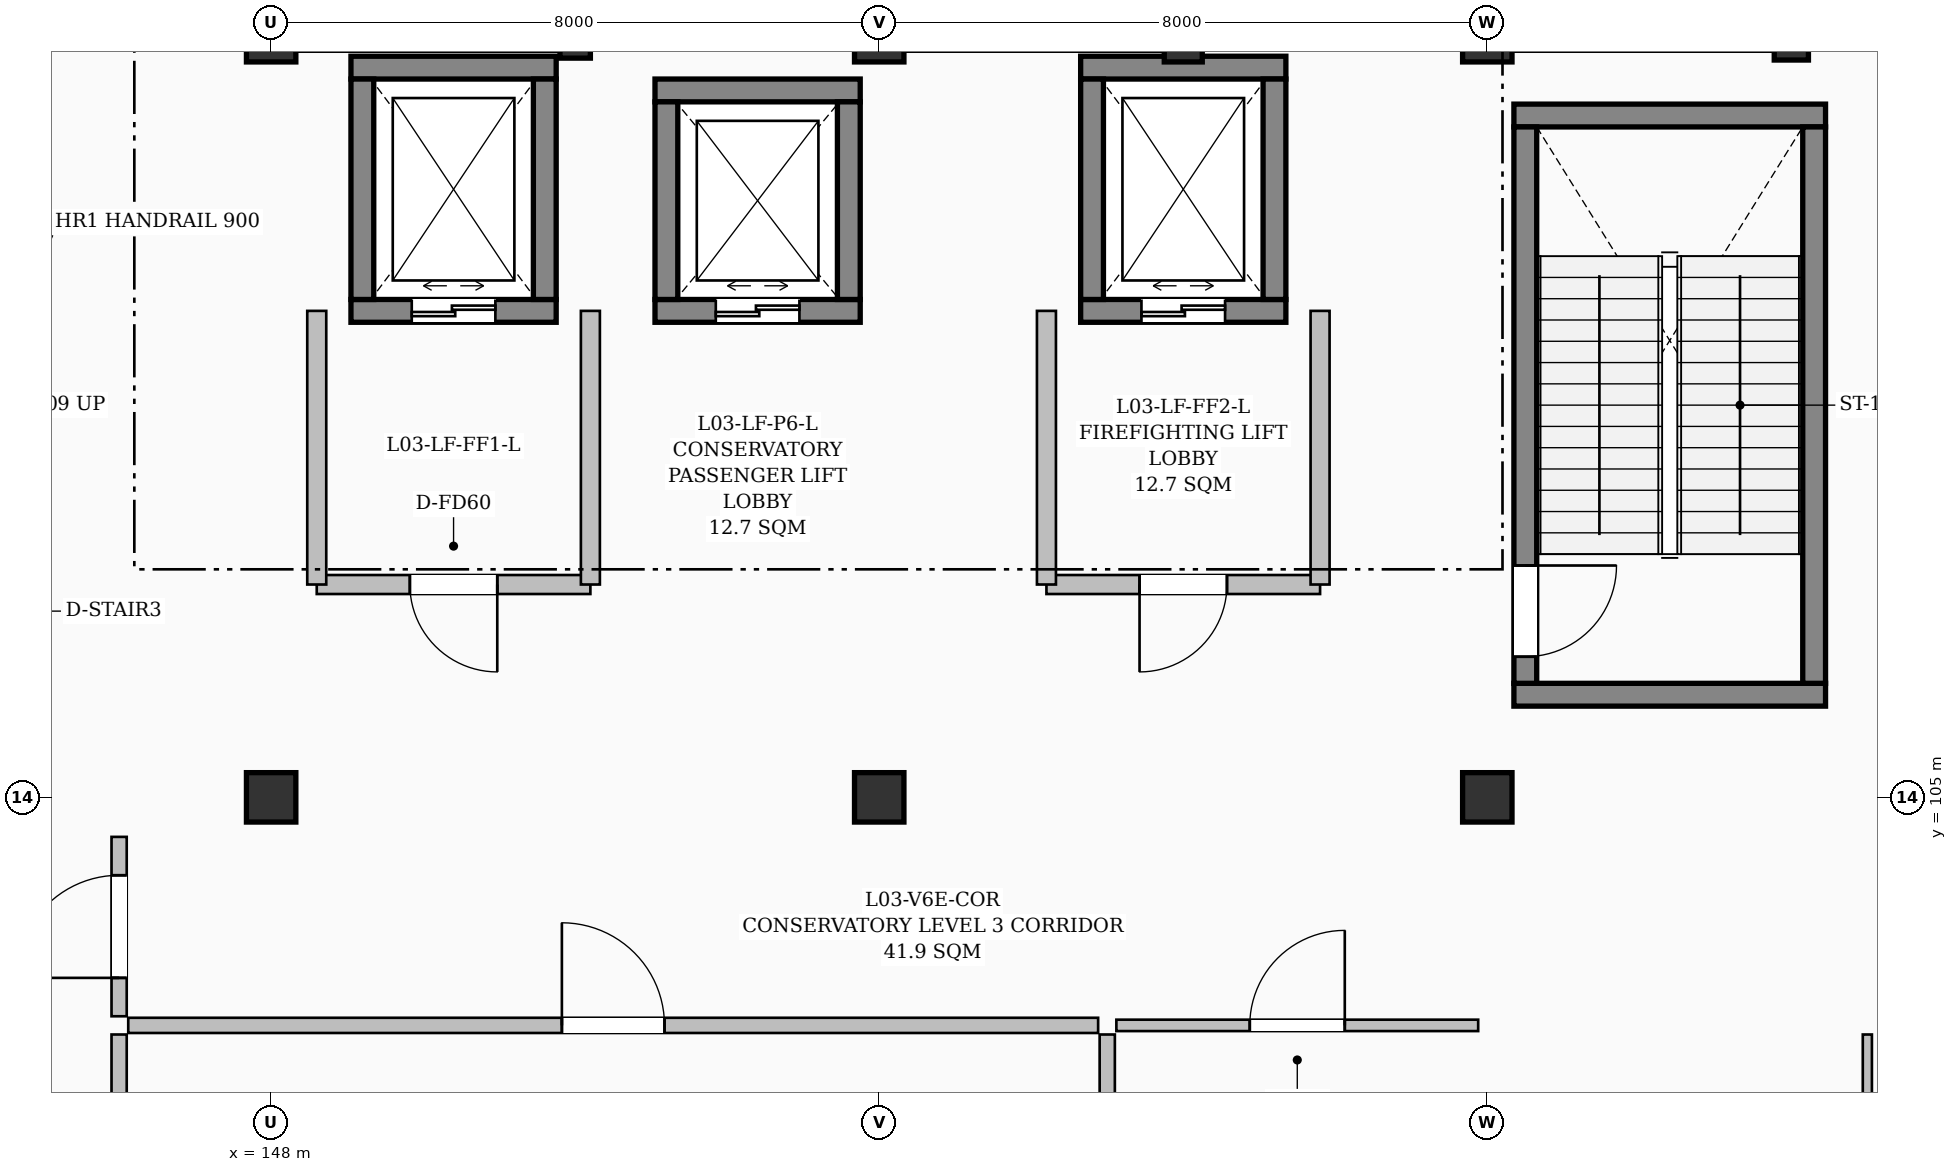
"""IFC4 building model, lengths in metres.
Left out: names, types, materials, properties, quantities, classifications, styles, units other than length and angle.
Written with IfcOpenShell. Run it as: python <this file> out.ifc"""

import sys

from ifc_helpers import new_model, si_unit, direction, frame, frame_2d, origin, origin_2d, place, context, subcontext, project, spatial, rectangle, extrude, element, fill, save


model = new_model("IFC4")
c1 = context("Model", 3, precision=1e-05, world=origin(), true_north=direction((0.0, 1.0)))
c2 = subcontext(c1, "Body", "Model", "MODEL_VIEW")
j1 = project(units=[si_unit("LENGTHUNIT", "METRE"), si_unit("PLANEANGLEUNIT", "RADIAN")], contexts=[c1])
p1 = place(None, origin())
s1 = spatial("IfcSite", under=j1, at=p1, CompositionType="ELEMENT")
p2 = place(p1, origin())
s2 = spatial("IfcBuilding", under=s1, at=p2, CompositionType="ELEMENT")
p3 = place(p2, frame((0.0, 0.0, 13.8)))
s3 = spatial("IfcBuildingStorey", under=s2, at=p3, CompositionType="ELEMENT", Elevation=13.8)
for number, where, z_axis, x_axis in (
    (1, (148.0, 105.0, 0.0), (0.0, 0.0, 1.0), (1.0, 0.0, 0.0)),
    (2, (148.0, 115.0, 0.0), (0.0, 0.0, 1.0), (1.0, 0.0, 0.0)),
):
    element("IfcColumn", number, at=place(p3, frame(where, z_axis=z_axis, x_axis=x_axis)), inside=s3, PredefinedType="COLUMN", context=c2, shape_type="SweptSolid", body=[
        extrude(rectangle(XDim=0.65, YDim=0.65, at=origin_2d()), origin(), (0.0, 0.0, 1.0), 4.5),
    ])
p4 = place(p3, frame((152.0, 115.0, 0.0), z_axis=(0.0, 0.0, 1.0), x_axis=(1.0, 0.0, 0.0)))
e3 = element("IfcColumn", 3, at=p4, inside=s3, PredefinedType="PILASTER", context=c2, shape_type="SweptSolid", body=[
    extrude(rectangle(XDim=0.4, YDim=0.55, at=origin_2d()), origin(), (0.0, 0.0, 1.0), 4.5),
])
for number, where, z_axis, x_axis in (
    (4, (156.0, 105.0, 0.0), (0.0, 0.0, 1.0), (1.0, 0.0, 0.0)),
    (5, (156.0, 115.0, 0.0), (0.0, 0.0, 1.0), (1.0, 0.0, 0.0)),
):
    element("IfcColumn", number, at=place(p3, frame(where, z_axis=z_axis, x_axis=x_axis)), inside=s3, PredefinedType="COLUMN", context=c2, shape_type="SweptSolid", body=[
        extrude(rectangle(XDim=0.65, YDim=0.65, at=origin_2d()), origin(), (0.0, 0.0, 1.0), 4.5),
    ])
p5 = place(p3, frame((160.0, 115.0, 0.0), z_axis=(0.0, 0.0, 1.0), x_axis=(1.0, 0.0, 0.0)))
e6 = element("IfcColumn", 6, at=p5, inside=s3, PredefinedType="PILASTER", context=c2, shape_type="SweptSolid", body=[
    extrude(rectangle(XDim=0.5, YDim=0.65, at=origin_2d()), origin(), (0.0, 0.0, 1.0), 4.5),
])
for number, where, z_axis, x_axis in (
    (7, (164.0, 105.0, 0.0), (0.0, 0.0, 1.0), (1.0, 0.0, 0.0)),
    (8, (164.0, 115.0, 0.0), (0.0, 0.0, 1.0), (1.0, 0.0, 0.0)),
):
    element("IfcColumn", number, at=place(p3, frame(where, z_axis=z_axis, x_axis=x_axis)), inside=s3, PredefinedType="COLUMN", context=c2, shape_type="SweptSolid", body=[
        extrude(rectangle(XDim=0.65, YDim=0.65, at=origin_2d()), origin(), (0.0, 0.0, 1.0), 4.5),
    ])
p6 = place(p3, frame((168.0, 115.0, 0.0), z_axis=(0.0, 0.0, 1.0), x_axis=(1.0, 0.0, 0.0)))
e9 = element("IfcColumn", 9, at=p6, inside=s3, PredefinedType="PILASTER", context=c2, shape_type="SweptSolid", body=[
    extrude(rectangle(XDim=0.45, YDim=0.6, at=origin_2d()), origin(), (0.0, 0.0, 1.0), 4.5),
])
for number, where, z_axis, x_axis in (
    (10, (164.35, 106.35, 0.0), (0.0, 0.0, 1.0), (1.0, 0.0, 0.0)),
    (11, (168.45, 113.97, 0.0), (0.0, 0.0, 1.0), (-1.0, 0.0, 0.0)),
):
    element("IfcWall", number, at=place(p3, frame(where, z_axis=z_axis, x_axis=x_axis)), inside=s3, PredefinedType="SHEAR", context=c2, shape_type="SweptSolid", body=[
        extrude(rectangle(XDim=4.1, YDim=0.3, at=frame_2d((2.05, 0.0))), origin(), (0.0, 0.0, 1.0), 4.27),
    ])
p7 = place(p3, frame((164.5, 113.82, 0.0), z_axis=(0.0, 0.0, 1.0), x_axis=(0.0, -1.0, 0.0)))
e12 = element("IfcWall", 12, at=p7, inside=s3, PredefinedType="SHEAR", context=c2, shape_type="SweptSolid", body=[
    extrude(rectangle(XDim=7.32, YDim=0.3, at=frame_2d((3.66, 0.0))), origin(), (0.0, 0.0, 1.0), 4.27),
])
p8 = place(p7, frame((5.77, 0.0, 0.0)))
e13 = element("IfcOpeningElement", 13, at=p8, cuts=e12, PredefinedType="OPENING", context=c2, shape_type="SweptSolid", body=[
    extrude(rectangle(XDim=1.2, YDim=2.15, at=frame_2d((0.6, 1.075))), frame((0.0, 0.16, 0.0), z_axis=(0.0, -1.0, 0.0), x_axis=(1.0, 0.0, 0.0)), (0.0, 0.0, 1.0), 0.32),
])
p9 = place(p3, frame((168.3, 113.82, 0.0), z_axis=(0.0, 0.0, 1.0), x_axis=(0.0, -1.0, 0.0)))
e14 = element("IfcWall", 14, at=p9, inside=s3, PredefinedType="SHEAR", context=c2, shape_type="SweptSolid", body=[
    extrude(rectangle(XDim=7.32, YDim=0.3, at=frame_2d((3.66, 0.0))), origin(), (0.0, 0.0, 1.0), 4.27),
])
p10 = place(p3, frame((149.05, 111.4, 0.0), z_axis=(0.0, 0.0, 1.0), x_axis=(1.0, 0.0, 0.0)))
e15 = element("IfcWall", 15, at=p10, inside=s3, PredefinedType="SHEAR", context=c2, shape_type="SweptSolid", body=[
    extrude(rectangle(XDim=2.7, YDim=0.3, at=frame_2d((1.35, 0.0))), origin(), (0.0, 0.0, 1.0), 4.27),
])
p11 = place(p10, frame((0.8, 0.0, 0.0)))
e16 = element("IfcOpeningElement", 16, at=p11, cuts=e15, PredefinedType="OPENING", context=c2, shape_type="SweptSolid", body=[
    extrude(rectangle(XDim=1.1, YDim=2.15, at=frame_2d((0.55, 1.075))), frame((0.0, 0.16, 0.0), z_axis=(0.0, -1.0, 0.0), x_axis=(1.0, 0.0, 0.0)), (0.0, 0.0, 1.0), 0.32),
])
p12 = place(p3, frame((151.75, 114.6, 0.0), z_axis=(0.0, 0.0, 1.0), x_axis=(-1.0, 0.0, 0.0)))
e17 = element("IfcWall", 17, at=p12, inside=s3, PredefinedType="SHEAR", context=c2, shape_type="SweptSolid", body=[
    extrude(rectangle(XDim=2.7, YDim=0.3, at=frame_2d((1.35, 0.0))), origin(), (0.0, 0.0, 1.0), 4.27),
])
for number, where, z_axis, x_axis in (
    (18, (149.2, 111.55, 0.0), (0.0, 0.0, 1.0), (0.0, 1.0, 0.0)),
    (19, (151.6, 114.45, 0.0), (0.0, 0.0, 1.0), (0.0, -1.0, 0.0)),
):
    element("IfcWall", number, at=place(p3, frame(where, z_axis=z_axis, x_axis=x_axis)), inside=s3, PredefinedType="SHEAR", context=c2, shape_type="SweptSolid", body=[
        extrude(rectangle(XDim=2.9, YDim=0.3, at=frame_2d((1.45, 0.0))), origin(), (0.0, 0.0, 1.0), 4.27),
    ])
p13 = place(p3, frame((152.2, 107.8, 0.0), z_axis=(0.0, 0.0, 1.0), x_axis=(-1.0, 0.0, 0.0)))
e20 = element("IfcWall", 20, at=p13, inside=s3, PredefinedType="SOLIDWALL", context=c2, shape_type="SweptSolid", body=[
    extrude(rectangle(XDim=3.6, YDim=0.25, at=frame_2d((1.8, 0.0))), origin(), (0.0, 0.0, 1.0), 4.27),
])
p14 = place(p13, frame((1.225, 0.0, 0.0)))
e21 = element("IfcOpeningElement", 21, at=p14, cuts=e20, PredefinedType="OPENING", context=c2, shape_type="SweptSolid", body=[
    extrude(rectangle(XDim=1.15, YDim=2.15, at=frame_2d((0.575, 1.075))), frame((0.0, 0.135, 0.0), z_axis=(0.0, -1.0, 0.0), x_axis=(1.0, 0.0, 0.0)), (0.0, 0.0, 1.0), 0.27),
])
for number, where, z_axis, x_axis in (
    (22, (148.6, 107.8, 0.0), (0.0, 0.0, 1.0), (0.0, 1.0, 0.0)),
    (23, (152.2, 111.4, 0.0), (0.0, 0.0, 1.0), (0.0, -1.0, 0.0)),
):
    element("IfcWall", number, at=place(p3, frame(where, z_axis=z_axis, x_axis=x_axis)), inside=s3, PredefinedType="SOLIDWALL", context=c2, shape_type="SweptSolid", body=[
        extrude(rectangle(XDim=3.6, YDim=0.25, at=frame_2d((1.8, 0.0))), origin(), (0.0, 0.0, 1.0), 4.27),
    ])
p15 = place(p3, frame((158.65, 111.4, 0.0), z_axis=(0.0, 0.0, 1.0), x_axis=(1.0, 0.0, 0.0)))
e24 = element("IfcWall", 24, at=p15, inside=s3, PredefinedType="SHEAR", context=c2, shape_type="SweptSolid", body=[
    extrude(rectangle(XDim=2.7, YDim=0.3, at=frame_2d((1.35, 0.0))), origin(), (0.0, 0.0, 1.0), 4.27),
])
p16 = place(p15, frame((0.8, 0.0, 0.0)))
e25 = element("IfcOpeningElement", 25, at=p16, cuts=e24, PredefinedType="OPENING", context=c2, shape_type="SweptSolid", body=[
    extrude(rectangle(XDim=1.1, YDim=2.15, at=frame_2d((0.55, 1.075))), frame((0.0, 0.16, 0.0), z_axis=(0.0, -1.0, 0.0), x_axis=(1.0, 0.0, 0.0)), (0.0, 0.0, 1.0), 0.32),
])
p17 = place(p3, frame((161.35, 114.6, 0.0), z_axis=(0.0, 0.0, 1.0), x_axis=(-1.0, 0.0, 0.0)))
e26 = element("IfcWall", 26, at=p17, inside=s3, PredefinedType="SHEAR", context=c2, shape_type="SweptSolid", body=[
    extrude(rectangle(XDim=2.7, YDim=0.3, at=frame_2d((1.35, 0.0))), origin(), (0.0, 0.0, 1.0), 4.27),
])
for number, where, z_axis, x_axis in (
    (27, (158.8, 111.55, 0.0), (0.0, 0.0, 1.0), (0.0, 1.0, 0.0)),
    (28, (161.2, 114.45, 0.0), (0.0, 0.0, 1.0), (0.0, -1.0, 0.0)),
):
    element("IfcWall", number, at=place(p3, frame(where, z_axis=z_axis, x_axis=x_axis)), inside=s3, PredefinedType="SHEAR", context=c2, shape_type="SweptSolid", body=[
        extrude(rectangle(XDim=2.9, YDim=0.3, at=frame_2d((1.45, 0.0))), origin(), (0.0, 0.0, 1.0), 4.27),
    ])
p18 = place(p3, frame((161.8, 107.8, 0.0), z_axis=(0.0, 0.0, 1.0), x_axis=(-1.0, 0.0, 0.0)))
e29 = element("IfcWall", 29, at=p18, inside=s3, PredefinedType="SOLIDWALL", context=c2, shape_type="SweptSolid", body=[
    extrude(rectangle(XDim=3.6, YDim=0.25, at=frame_2d((1.8, 0.0))), origin(), (0.0, 0.0, 1.0), 4.27),
])
p19 = place(p18, frame((1.225, 0.0, 0.0)))
e30 = element("IfcOpeningElement", 30, at=p19, cuts=e29, PredefinedType="OPENING", context=c2, shape_type="SweptSolid", body=[
    extrude(rectangle(XDim=1.15, YDim=2.15, at=frame_2d((0.575, 1.075))), frame((0.0, 0.135, 0.0), z_axis=(0.0, -1.0, 0.0), x_axis=(1.0, 0.0, 0.0)), (0.0, 0.0, 1.0), 0.27),
])
for number, where, z_axis, x_axis in (
    (31, (158.2, 107.8, 0.0), (0.0, 0.0, 1.0), (0.0, 1.0, 0.0)),
    (32, (161.8, 111.4, 0.0), (0.0, 0.0, 1.0), (0.0, -1.0, 0.0)),
):
    element("IfcWall", number, at=place(p3, frame(where, z_axis=z_axis, x_axis=x_axis)), inside=s3, PredefinedType="SOLIDWALL", context=c2, shape_type="SweptSolid", body=[
        extrude(rectangle(XDim=3.6, YDim=0.25, at=frame_2d((1.8, 0.0))), origin(), (0.0, 0.0, 1.0), 4.27),
    ])
p20 = place(p3, frame((153.05, 111.4, 0.0), z_axis=(0.0, 0.0, 1.0), x_axis=(1.0, 0.0, 0.0)))
e33 = element("IfcWall", 33, at=p20, inside=s3, PredefinedType="SHEAR", context=c2, shape_type="SweptSolid", body=[
    extrude(rectangle(XDim=2.7, YDim=0.3, at=frame_2d((1.35, 0.0))), origin(), (0.0, 0.0, 1.0), 4.27),
])
p21 = place(p20, frame((0.8, 0.0, 0.0)))
e34 = element("IfcOpeningElement", 34, at=p21, cuts=e33, PredefinedType="OPENING", context=c2, shape_type="SweptSolid", body=[
    extrude(rectangle(XDim=1.1, YDim=2.15, at=frame_2d((0.55, 1.075))), frame((0.0, 0.16, 0.0), z_axis=(0.0, -1.0, 0.0), x_axis=(1.0, 0.0, 0.0)), (0.0, 0.0, 1.0), 0.32),
])
p22 = place(p3, frame((155.75, 114.3, 0.0), z_axis=(0.0, 0.0, 1.0), x_axis=(-1.0, 0.0, 0.0)))
e35 = element("IfcWall", 35, at=p22, inside=s3, PredefinedType="SHEAR", context=c2, shape_type="SweptSolid", body=[
    extrude(rectangle(XDim=2.7, YDim=0.3, at=frame_2d((1.35, 0.0))), origin(), (0.0, 0.0, 1.0), 4.27),
])
for number, where, z_axis, x_axis in (
    (36, (153.2, 111.55, 0.0), (0.0, 0.0, 1.0), (0.0, 1.0, 0.0)),
    (37, (155.6, 114.15, 0.0), (0.0, 0.0, 1.0), (0.0, -1.0, 0.0)),
):
    element("IfcWall", number, at=place(p3, frame(where, z_axis=z_axis, x_axis=x_axis)), inside=s3, PredefinedType="SHEAR", context=c2, shape_type="SweptSolid", body=[
        extrude(rectangle(XDim=2.6, YDim=0.3, at=frame_2d((1.3, 0.0))), origin(), (0.0, 0.0, 1.0), 4.27),
    ])
p23 = place(p3, frame((146.0, 95.12, 0.0), z_axis=(0.0, 0.0, 1.0), x_axis=(0.0, 1.0, 0.0)))
e38 = element("IfcWall", 38, at=p23, inside=s3, PredefinedType="PARTITIONING", context=c2, shape_type="SweptSolid", body=[
    extrude(rectangle(XDim=6.76, YDim=0.2, at=frame_2d((3.38, 0.0))), origin(), (0.0, 0.0, 1.0), 4.27),
])
p24 = place(p23, frame((2.705, 0.0, 0.0)))
e39 = element("IfcOpeningElement", 39, at=p24, cuts=e38, PredefinedType="OPENING", context=c2, shape_type="SweptSolid", body=[
    extrude(rectangle(XDim=1.35, YDim=2.2, at=frame_2d((0.675, 1.1))), frame((0.0, 0.11, 0.0), z_axis=(0.0, -1.0, 0.0), x_axis=(1.0, 0.0, 0.0)), (0.0, 0.0, 1.0), 0.22),
])
p25 = place(p3, frame((146.0, 102.12, 0.0), z_axis=(0.0, 0.0, 1.0), x_axis=(0.0, 1.0, 0.0)))
e40 = element("IfcWall", 40, at=p25, inside=s3, PredefinedType="PARTITIONING", context=c2, shape_type="SweptSolid", body=[
    extrude(rectangle(XDim=2.36, YDim=0.2, at=frame_2d((1.18, 0.0))), origin(), (0.0, 0.0, 1.0), 4.27),
])
p26 = place(p25, frame((0.505, 0.0, 0.0)))
e41 = element("IfcOpeningElement", 41, at=p26, cuts=e40, PredefinedType="OPENING", context=c2, shape_type="SweptSolid", body=[
    extrude(rectangle(XDim=1.35, YDim=2.2, at=frame_2d((0.675, 1.1))), frame((0.0, 0.11, 0.0), z_axis=(0.0, -1.0, 0.0), x_axis=(1.0, 0.0, 0.0)), (0.0, 0.0, 1.0), 0.22),
])
p27 = place(p3, frame((159.0, 95.12, 0.0), z_axis=(0.0, 0.0, 1.0), x_axis=(0.0, 1.0, 0.0)))
e42 = element("IfcWall", 42, at=p27, inside=s3, PredefinedType="PARTITIONING", context=c2, shape_type="SweptSolid", body=[
    extrude(rectangle(XDim=6.76, YDim=0.2, at=frame_2d((3.38, 0.0))), origin(), (0.0, 0.0, 1.0), 4.27),
])
p28 = place(p27, frame((2.705, 0.0, 0.0)))
e43 = element("IfcOpeningElement", 43, at=p28, cuts=e42, PredefinedType="OPENING", context=c2, shape_type="SweptSolid", body=[
    extrude(rectangle(XDim=1.35, YDim=2.2, at=frame_2d((0.675, 1.1))), frame((0.0, 0.11, 0.0), z_axis=(0.0, -1.0, 0.0), x_axis=(1.0, 0.0, 0.0)), (0.0, 0.0, 1.0), 0.22),
])
p29 = place(p3, frame((146.12, 102.0, 0.0), z_axis=(0.0, 0.0, 1.0), x_axis=(1.0, 0.0, 0.0)))
e44 = element("IfcWall", 44, at=p29, inside=s3, PredefinedType="PARTITIONING", context=c2, shape_type="SweptSolid", body=[
    extrude(rectangle(XDim=12.76, YDim=0.2, at=frame_2d((6.38, 0.0))), origin(), (0.0, 0.0, 1.0), 3.895),
])
p30 = place(p29, frame((5.705, 0.0, 0.0)))
e45 = element("IfcOpeningElement", 45, at=p30, cuts=e44, PredefinedType="OPENING", context=c2, shape_type="SweptSolid", body=[
    extrude(rectangle(XDim=1.35, YDim=2.2, at=frame_2d((0.675, 1.1))), frame((0.0, 0.11, 0.0), z_axis=(0.0, -1.0, 0.0), x_axis=(1.0, 0.0, 0.0)), (0.0, 0.0, 1.0), 0.22),
])
p31 = place(p3, frame((159.12, 102.0, 0.0), z_axis=(0.0, 0.0, 1.0), x_axis=(1.0, 0.0, 0.0)))
e46 = element("IfcWall", 46, at=p31, inside=s3, PredefinedType="PARTITIONING", context=c2, shape_type="SweptSolid", body=[
    extrude(rectangle(XDim=4.76, YDim=0.15, at=frame_2d((2.38, 0.0))), origin(), (0.0, 0.0, 1.0), 3.925),
])
p32 = place(p31, frame((1.755, 0.0, 0.0)))
e47 = element("IfcOpeningElement", 47, at=p32, cuts=e46, PredefinedType="OPENING", context=c2, shape_type="SweptSolid", body=[
    extrude(rectangle(XDim=1.25, YDim=2.15, at=frame_2d((0.625, 1.075))), frame((0.0, 0.085, 0.0), z_axis=(0.0, -1.0, 0.0), x_axis=(1.0, 0.0, 0.0)), (0.0, 0.0, 1.0), 0.17),
])
p33 = place(p3, frame((169.0, 98.12, 0.0), z_axis=(0.0, 0.0, 1.0), x_axis=(0.0, 1.0, 0.0)))
e48 = element("IfcWall", 48, at=p33, inside=s3, PredefinedType="PARTITIONING", context=c2, shape_type="SweptSolid", body=[
    extrude(rectangle(XDim=3.76, YDim=0.12, at=frame_2d((1.88, 0.0))), origin(), (0.0, 0.0, 1.0), 4.27),
])
p34 = place(p33, frame((1.405, 0.0, 0.0)))
e49 = element("IfcOpeningElement", 49, at=p34, cuts=e48, PredefinedType="OPENING", context=c2, shape_type="SweptSolid", body=[
    extrude(rectangle(XDim=0.95, YDim=2.1, at=frame_2d((0.475, 1.05))), frame((0.0, 0.07, 0.0), z_axis=(0.0, -1.0, 0.0), x_axis=(1.0, 0.0, 0.0)), (0.0, 0.0, 1.0), 0.14),
])
p35 = place(p8, origin())
e50 = element("IfcDoor", 50, at=p35, inside=s3, OperationType="SINGLE_SWING_LEFT", PredefinedType="DOOR", context=c2, shape_type="SweptSolid", body=[
    extrude(rectangle(XDim=1.2, YDim=2.15, at=frame_2d((0.6, 1.075))), frame((0.0, 0.025, 0.0), z_axis=(0.0, -1.0, 0.0), x_axis=(1.0, 0.0, 0.0)), (0.0, 0.0, 1.0), 0.05),
])
fill(e13, e50)
p36 = place(p11, origin())
e51 = element("IfcDoor", 51, at=p36, inside=s3, OperationType="DOUBLE_DOOR_SLIDING", PredefinedType="DOOR", context=c2, shape_type="SweptSolid", body=[
    extrude(rectangle(XDim=1.1, YDim=2.15, at=frame_2d((0.55, 1.075))), frame((0.0, 0.025, 0.0), z_axis=(0.0, -1.0, 0.0), x_axis=(1.0, 0.0, 0.0)), (0.0, 0.0, 1.0), 0.05),
])
fill(e16, e51)
p37 = place(p14, origin())
e52 = element("IfcDoor", 52, at=p37, inside=s3, OperationType="SINGLE_SWING_LEFT", PredefinedType="DOOR", context=c2, shape_type="SweptSolid", body=[
    extrude(rectangle(XDim=1.15, YDim=2.15, at=frame_2d((0.575, 1.075))), frame((0.0, 0.025, 0.0), z_axis=(0.0, -1.0, 0.0), x_axis=(1.0, 0.0, 0.0)), (0.0, 0.0, 1.0), 0.05),
])
fill(e21, e52)
p38 = place(p16, origin())
e53 = element("IfcDoor", 53, at=p38, inside=s3, OperationType="DOUBLE_DOOR_SLIDING", PredefinedType="DOOR", context=c2, shape_type="SweptSolid", body=[
    extrude(rectangle(XDim=1.1, YDim=2.15, at=frame_2d((0.55, 1.075))), frame((0.0, 0.025, 0.0), z_axis=(0.0, -1.0, 0.0), x_axis=(1.0, 0.0, 0.0)), (0.0, 0.0, 1.0), 0.05),
])
fill(e25, e53)
p39 = place(p19, origin())
e54 = element("IfcDoor", 54, at=p39, inside=s3, OperationType="SINGLE_SWING_RIGHT", PredefinedType="DOOR", context=c2, shape_type="SweptSolid", body=[
    extrude(rectangle(XDim=1.15, YDim=2.15, at=frame_2d((0.575, 1.075))), frame((0.0, 0.025, 0.0), z_axis=(0.0, -1.0, 0.0), x_axis=(1.0, 0.0, 0.0)), (0.0, 0.0, 1.0), 0.05),
])
fill(e30, e54)
p40 = place(p21, origin())
e55 = element("IfcDoor", 55, at=p40, inside=s3, OperationType="DOUBLE_DOOR_SLIDING", PredefinedType="DOOR", context=c2, shape_type="SweptSolid", body=[
    extrude(rectangle(XDim=1.1, YDim=2.15, at=frame_2d((0.55, 1.075))), frame((0.0, 0.025, 0.0), z_axis=(0.0, -1.0, 0.0), x_axis=(1.0, 0.0, 0.0)), (0.0, 0.0, 1.0), 0.05),
])
fill(e34, e55)
p41 = place(p26, origin())
e56 = element("IfcDoor", 56, at=p41, inside=s3, OperationType="SINGLE_SWING_LEFT", PredefinedType="DOOR", context=c2, shape_type="SweptSolid", body=[
    extrude(rectangle(XDim=1.35, YDim=2.2, at=frame_2d((0.675, 1.1))), frame((0.0, 0.025, 0.0), z_axis=(0.0, -1.0, 0.0), x_axis=(1.0, 0.0, 0.0)), (0.0, 0.0, 1.0), 0.05),
])
fill(e41, e56)
p42 = place(p30, origin())
e57 = element("IfcDoor", 57, at=p42, inside=s3, OperationType="SINGLE_SWING_LEFT", PredefinedType="DOOR", context=c2, shape_type="SweptSolid", body=[
    extrude(rectangle(XDim=1.35, YDim=2.2, at=frame_2d((0.675, 1.1))), frame((0.0, 0.025, 0.0), z_axis=(0.0, -1.0, 0.0), x_axis=(1.0, 0.0, 0.0)), (0.0, 0.0, 1.0), 0.05),
])
fill(e45, e57)
p43 = place(p32, origin())
e58 = element("IfcDoor", 58, at=p43, inside=s3, OperationType="SINGLE_SWING_RIGHT", PredefinedType="DOOR", context=c2, shape_type="SweptSolid", body=[
    extrude(rectangle(XDim=1.25, YDim=2.15, at=frame_2d((0.625, 1.075))), frame((0.0, 0.025, 0.0), z_axis=(0.0, -1.0, 0.0), x_axis=(1.0, 0.0, 0.0)), (0.0, 0.0, 1.0), 0.05),
])
fill(e47, e58)
save(model, sys.argv[1])
